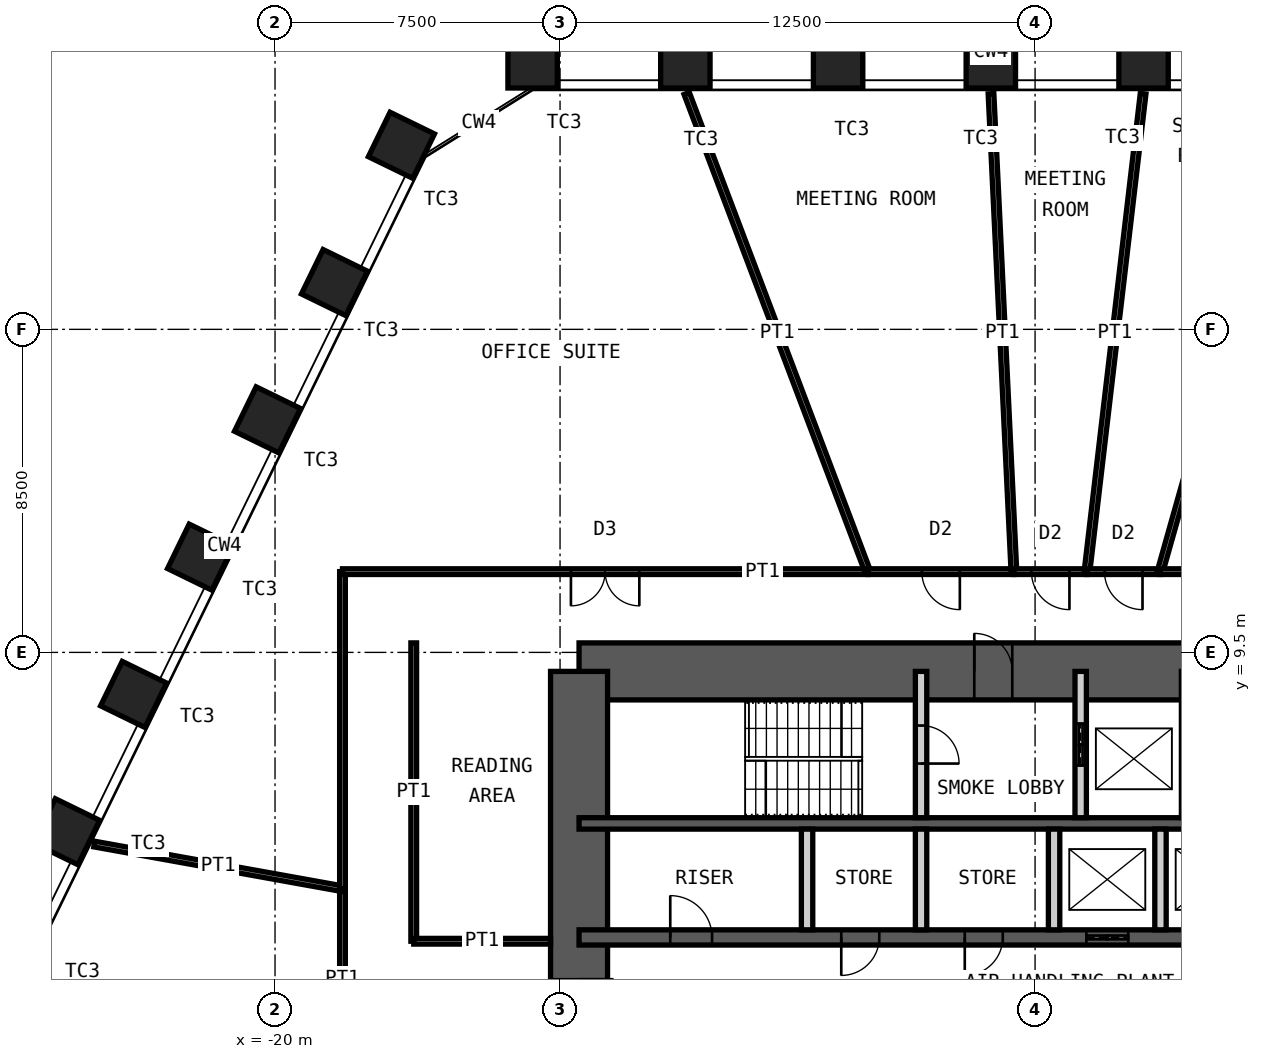
"""IFC4 building model, lengths in metres.
Left out: names, types, materials, properties, quantities, classifications, styles, units other than length and angle.
Written with IfcOpenShell. Run it as: python <this file> out.ifc"""

import sys

from ifc_helpers import new_model, si_unit, direction, frame, frame_2d, origin, origin_2d, place, context, subcontext, project, spatial, rectangle, hollow_rectangle, extrude, element, fill, save


model = new_model("IFC4")
c1 = context("Model", 3, precision=1e-05, world=origin(), true_north=direction((0.0, 1.0)))
c2 = subcontext(c1, "Body", "Model", "MODEL_VIEW")
j1 = project(units=[si_unit("LENGTHUNIT", "METRE"), si_unit("PLANEANGLEUNIT", "RADIAN")], contexts=[c1])
p1 = place(None, origin())
s1 = spatial("IfcSite", under=j1, at=p1, CompositionType="ELEMENT")
p2 = place(p1, origin())
s2 = spatial("IfcBuilding", under=s1, at=p2, CompositionType="ELEMENT")
p3 = place(p2, frame((0.0, 0.0, 111.4)))
s3 = spatial("IfcBuildingStorey", under=s2, at=p3, CompositionType="ELEMENT", Elevation=111.4)
for number, where, z_axis, x_axis in (
    (1, (-13.222, 25.0, 0.0), (0.0, 0.0, 1.0), (-1.0, 0.0, 0.0)),
    (2, (-9.203, 25.0, 0.0), (0.0, 0.0, 1.0), (-1.0, 0.0, 0.0)),
    (3, (-5.184, 25.0, 0.0), (0.0, 0.0, 1.0), (-1.0, 0.0, 0.0)),
    (4, (-1.165, 25.0, 0.0), (0.0, 0.0, 1.0), (-1.0, 0.0, 0.0)),
    (5, (2.854, 25.0, 0.0), (0.0, 0.0, 1.0), (-1.0, 0.0, 0.0)),
    (6, (-25.483, 4.781, 0.0), (0.0, 0.0, 1.0), (-0.438, -0.899, 0.0)),
    (7, (-23.721, 8.394, 0.0), (0.0, 0.0, 1.0), (-0.438, -0.899, 0.0)),
    (8, (-21.959, 12.006, 0.0), (0.0, 0.0, 1.0), (-0.438, -0.899, 0.0)),
    (9, (-20.198, 15.618, 0.0), (0.0, 0.0, 1.0), (-0.438, -0.899, 0.0)),
    (10, (-18.436, 19.23, 0.0), (0.0, 0.0, 1.0), (-0.438, -0.899, 0.0)),
    (11, (-16.674, 22.843, 0.0), (0.0, 0.0, 1.0), (-0.438, -0.899, 0.0)),
):
    element("IfcColumn", number, at=place(p3, frame(where, z_axis=z_axis, x_axis=x_axis)), inside=s3, PredefinedType="COLUMN", context=c2, shape_type="SweptSolid", body=[
        extrude(hollow_rectangle(XDim=1.3, YDim=1.3, WallThickness=0.1, at=origin_2d()), origin(), (0.0, 0.0, 1.0), 4.2),
    ])
p4 = place(p3, frame((-12.0, 9.0, 0.0), z_axis=(0.0, 0.0, 1.0), x_axis=(1.0, 0.0, 0.0)))
e12 = element("IfcWall", 12, at=p4, inside=s3, PredefinedType="SHEAR", context=c2, shape_type="SweptSolid", body=[
    extrude(rectangle(XDim=24.0, YDim=1.5, at=frame_2d((12.0, 0.0))), origin(), (0.0, 0.0, 1.0), 4.2),
])
p5 = place(p4, frame((10.4, 0.0, 0.0)))
e13 = element("IfcOpeningElement", 13, at=p5, cuts=e12, PredefinedType="OPENING", context=c2, shape_type="SweptSolid", body=[
    extrude(rectangle(XDim=1.0, YDim=2.1, at=frame_2d((0.5, 1.05))), frame((0.0, 0.76, 0.0), z_axis=(0.0, -1.0, 0.0), x_axis=(1.0, 0.0, 0.0)), (0.0, 0.0, 1.0), 1.52),
])
p6 = place(p4, frame((17.6, 0.0, 0.0)))
e14 = element("IfcOpeningElement", 14, at=p6, cuts=e12, PredefinedType="OPENING", context=c2, shape_type="SweptSolid", body=[
    extrude(rectangle(XDim=0.9, YDim=2.1, at=frame_2d((0.45, 1.05))), frame((0.0, 0.76, 0.0), z_axis=(0.0, -1.0, 0.0), x_axis=(1.0, 0.0, 0.0)), (0.0, 0.0, 1.0), 1.52),
])
p7 = place(p4, frame((21.9, 0.0, 0.0)))
e15 = element("IfcOpeningElement", 15, at=p7, cuts=e12, PredefinedType="OPENING", context=c2, shape_type="SweptSolid", body=[
    extrude(rectangle(XDim=0.9, YDim=2.1, at=frame_2d((0.45, 1.05))), frame((0.0, 0.76, 0.0), z_axis=(0.0, -1.0, 0.0), x_axis=(1.0, 0.0, 0.0)), (0.0, 0.0, 1.0), 1.52),
])
p8 = place(p3, frame((-12.0, -9.0, 0.0), z_axis=(0.0, 0.0, 1.0), x_axis=(0.0, 1.0, 0.0)))
e16 = element("IfcWall", 16, at=p8, inside=s3, PredefinedType="SHEAR", context=c2, shape_type="SweptSolid", body=[
    extrude(rectangle(XDim=18.0, YDim=1.5, at=frame_2d((9.0, 0.0))), origin(), (0.0, 0.0, 1.0), 4.2),
])
p9 = place(p8, frame((8.1, 0.0, 0.0)))
e17 = element("IfcOpeningElement", 17, at=p9, cuts=e16, PredefinedType="OPENING", context=c2, shape_type="SweptSolid", body=[
    extrude(rectangle(XDim=1.8, YDim=2.1, at=frame_2d((0.9, 1.05))), frame((0.0, 0.76, 0.0), z_axis=(0.0, -1.0, 0.0), x_axis=(1.0, 0.0, 0.0)), (0.0, 0.0, 1.0), 1.52),
])
p10 = place(p3, frame((-12.0, 5.0, 0.0), z_axis=(0.0, 0.0, 1.0), x_axis=(1.0, 0.0, 0.0)))
e18 = element("IfcWall", 18, at=p10, inside=s3, PredefinedType="SHEAR", context=c2, shape_type="SweptSolid", body=[
    extrude(rectangle(XDim=24.0, YDim=0.3, at=frame_2d((12.0, 0.0))), origin(), (0.0, 0.0, 1.0), 4.2),
])
p11 = place(p3, frame((-12.0, 2.0, 0.0), z_axis=(0.0, 0.0, 1.0), x_axis=(1.0, 0.0, 0.0)))
e19 = element("IfcWall", 19, at=p11, inside=s3, PredefinedType="SHEAR", context=c2, shape_type="SweptSolid", body=[
    extrude(rectangle(XDim=24.0, YDim=0.4, at=frame_2d((12.0, 0.0))), origin(), (0.0, 0.0, 1.0), 4.2),
])
p12 = place(p11, frame((2.4, 0.0, 0.0)))
e20 = element("IfcOpeningElement", 20, at=p12, cuts=e19, PredefinedType="OPENING", context=c2, shape_type="SweptSolid", body=[
    extrude(rectangle(XDim=1.1, YDim=2.1, at=frame_2d((0.55, 1.05))), frame((0.0, 0.21, 0.0), z_axis=(0.0, -1.0, 0.0), x_axis=(1.0, 0.0, 0.0)), (0.0, 0.0, 1.0), 0.42),
])
p13 = place(p11, frame((22.0, 0.0, 0.0)))
e21 = element("IfcOpeningElement", 21, at=p13, cuts=e19, PredefinedType="OPENING", context=c2, shape_type="SweptSolid", body=[
    extrude(rectangle(XDim=1.1, YDim=2.1, at=frame_2d((0.55, 1.05))), frame((0.0, 0.21, 0.0), z_axis=(0.0, -1.0, 0.0), x_axis=(1.0, 0.0, 0.0)), (0.0, 0.0, 1.0), 0.42),
])
p14 = place(p11, frame((10.15, 0.0, 0.0)))
e22 = element("IfcOpeningElement", 22, at=p14, cuts=e19, PredefinedType="OPENING", context=c2, shape_type="SweptSolid", body=[
    extrude(rectangle(XDim=1.0, YDim=2.1, at=frame_2d((0.5, 1.05))), frame((0.0, 0.21, 0.0), z_axis=(0.0, -1.0, 0.0), x_axis=(1.0, 0.0, 0.0)), (0.0, 0.0, 1.0), 0.42),
])
p15 = place(p11, frame((6.9, 0.0, 0.0)))
e23 = element("IfcOpeningElement", 23, at=p15, cuts=e19, PredefinedType="OPENING", context=c2, shape_type="SweptSolid", body=[
    extrude(rectangle(XDim=1.0, YDim=2.1, at=frame_2d((0.5, 1.05))), frame((0.0, 0.21, 0.0), z_axis=(0.0, -1.0, 0.0), x_axis=(1.0, 0.0, 0.0)), (0.0, 0.0, 1.0), 0.42),
])
p16 = place(p11, frame((13.35, 0.0, 0.0)))
e24 = element("IfcOpeningElement", 24, at=p16, cuts=e19, PredefinedType="OPENING", context=c2, shape_type="SweptSolid", body=[
    extrude(rectangle(XDim=1.1, YDim=2.4, at=frame_2d((0.55, 1.2))), frame((0.0, 0.21, 0.0), z_axis=(0.0, -1.0, 0.0), x_axis=(1.0, 0.0, 0.0)), (0.0, 0.0, 1.0), 0.42),
])
p17 = place(p11, frame((16.15, 0.0, 0.0)))
e25 = element("IfcOpeningElement", 25, at=p17, cuts=e19, PredefinedType="OPENING", context=c2, shape_type="SweptSolid", body=[
    extrude(rectangle(XDim=1.1, YDim=2.4, at=frame_2d((0.55, 1.2))), frame((0.0, 0.21, 0.0), z_axis=(0.0, -1.0, 0.0), x_axis=(1.0, 0.0, 0.0)), (0.0, 0.0, 1.0), 0.42),
])
p18 = place(p11, frame((18.95, 0.0, 0.0)))
e26 = element("IfcOpeningElement", 26, at=p18, cuts=e19, PredefinedType="OPENING", context=c2, shape_type="SweptSolid", body=[
    extrude(rectangle(XDim=1.1, YDim=2.4, at=frame_2d((0.55, 1.2))), frame((0.0, 0.21, 0.0), z_axis=(0.0, -1.0, 0.0), x_axis=(1.0, 0.0, 0.0)), (0.0, 0.0, 1.0), 0.42),
])
p19 = place(p3, frame((-3.0, 5.15, 0.0), z_axis=(0.0, 0.0, 1.0), x_axis=(0.0, 1.0, 0.0)))
e27 = element("IfcWall", 27, at=p19, inside=s3, PredefinedType="PARTITIONING", context=c2, shape_type="SweptSolid", body=[
    extrude(rectangle(XDim=3.85, YDim=0.3, at=frame_2d((1.925, 0.0))), origin(), (0.0, 0.0, 1.0), 3.98),
])
p20 = place(p19, frame((1.425, 0.0, 0.0)))
e28 = element("IfcOpeningElement", 28, at=p20, cuts=e27, PredefinedType="OPENING", context=c2, shape_type="SweptSolid", body=[
    extrude(rectangle(XDim=1.0, YDim=2.1, at=frame_2d((0.5, 1.05))), frame((0.0, 0.16, 0.0), z_axis=(0.0, -1.0, 0.0), x_axis=(1.0, 0.0, 0.0)), (0.0, 0.0, 1.0), 0.32),
])
p21 = place(p3, frame((1.2, 5.15, 0.0), z_axis=(0.0, 0.0, 1.0), x_axis=(0.0, 1.0, 0.0)))
e29 = element("IfcWall", 29, at=p21, inside=s3, PredefinedType="PARTITIONING", context=c2, shape_type="SweptSolid", body=[
    extrude(rectangle(XDim=3.85, YDim=0.3, at=frame_2d((1.925, 0.0))), origin(), (0.0, 0.0, 1.0), 3.98),
])
p22 = place(p21, frame((1.375, 0.0, 0.0)))
e30 = element("IfcOpeningElement", 30, at=p22, cuts=e29, PredefinedType="OPENING", context=c2, shape_type="SweptSolid", body=[
    extrude(rectangle(XDim=1.1, YDim=2.4, at=frame_2d((0.55, 1.2))), frame((0.0, 0.16, 0.0), z_axis=(0.0, -1.0, 0.0), x_axis=(1.0, 0.0, 0.0)), (0.0, 0.0, 1.0), 0.32),
])
p23 = place(p3, frame((4.0, 5.15, 0.0), z_axis=(0.0, 0.0, 1.0), x_axis=(0.0, 1.0, 0.0)))
e31 = element("IfcWall", 31, at=p23, inside=s3, PredefinedType="PARTITIONING", context=c2, shape_type="SweptSolid", body=[
    extrude(rectangle(XDim=3.85, YDim=0.3, at=frame_2d((1.925, 0.0))), origin(), (0.0, 0.0, 1.0), 3.98),
])
for number, where, z_axis, x_axis in (
    (32, (-6.0, 2.2, 0.0), (0.0, 0.0, 1.0), (0.0, 1.0, 0.0)),
    (33, (-3.0, 2.2, 0.0), (0.0, 0.0, 1.0), (0.0, 1.0, 0.0)),
    (34, (0.5, 2.2, 0.0), (0.0, 0.0, 1.0), (0.0, 1.0, 0.0)),
    (35, (3.3, 2.2, 0.0), (0.0, 0.0, 1.0), (0.0, 1.0, 0.0)),
):
    element("IfcWall", number, at=place(p3, frame(where, z_axis=z_axis, x_axis=x_axis)), inside=s3, PredefinedType="PARTITIONING", context=c2, shape_type="SweptSolid", body=[
        extrude(rectangle(XDim=2.65, YDim=0.3, at=frame_2d((1.325, 0.0))), origin(), (0.0, 0.0, 1.0), 3.98),
    ])
p24 = place(p3, frame((-18.225, -11.625, 0.0), z_axis=(0.0, 0.0, 1.0), x_axis=(0.0, 1.0, 0.0)))
e36 = element("IfcWall", 36, at=p24, inside=s3, PredefinedType="PARTITIONING", context=c2, shape_type="SweptSolid", body=[
    extrude(rectangle(XDim=14.906, YDim=0.15, at=frame_2d((7.453, 0.0))), origin(), (0.0, 0.0, 1.0), 4.03),
])
p25 = place(p24, frame((6.553, 0.0, 0.0)))
e37 = element("IfcOpeningElement", 37, at=p25, cuts=e36, PredefinedType="OPENING", context=c2, shape_type="SweptSolid", body=[
    extrude(rectangle(XDim=1.8, YDim=2.4, at=frame_2d((0.9, 1.2))), frame((0.0, 0.085, 0.0), z_axis=(0.0, -1.0, 0.0), x_axis=(1.0, 0.0, 0.0)), (0.0, 0.0, 1.0), 0.17),
])
p26 = place(p3, frame((-24.755, 4.457, 0.0), z_axis=(0.0, 0.0, 1.0), x_axis=(0.984174598206, -0.177201467959, 0.0)))
e38 = element("IfcWall", 38, at=p26, inside=s3, PredefinedType="PARTITIONING", context=c2, shape_type="SweptSolid", body=[
    extrude(rectangle(XDim=6.635, YDim=0.15, at=frame_2d((3.318, 0.0))), origin(), (0.0, 0.0, 1.0), 3.33),
])
p27 = place(p3, frame((-18.225, 3.281, 0.0), z_axis=(0.0, 0.0, 1.0), x_axis=(0.0, 1.0, 0.0)))
e39 = element("IfcWall", 39, at=p27, inside=s3, PredefinedType="PARTITIONING", context=c2, shape_type="SweptSolid", body=[
    extrude(rectangle(XDim=8.344, YDim=0.15, at=frame_2d((4.172, 0.0))), origin(), (0.0, 0.0, 1.0), 4.03),
])
p28 = place(p3, frame((-18.225, 11.625, 0.0), z_axis=(0.0, 0.0, 1.0), x_axis=(1.0, 0.0, 0.0)))
e40 = element("IfcWall", 40, at=p28, inside=s3, PredefinedType="PARTITIONING", context=c2, shape_type="SweptSolid", body=[
    extrude(rectangle(XDim=13.823, YDim=0.15, at=frame_2d((6.911, 0.0))), origin(), (0.0, 0.0, 1.0), 4.03),
])
p29 = place(p28, frame((6.011, 0.0, 0.0)))
e41 = element("IfcOpeningElement", 41, at=p29, cuts=e40, PredefinedType="OPENING", context=c2, shape_type="SweptSolid", body=[
    extrude(rectangle(XDim=1.8, YDim=2.4, at=frame_2d((0.9, 1.2))), frame((0.0, 0.085, 0.0), z_axis=(0.0, -1.0, 0.0), x_axis=(1.0, 0.0, 0.0)), (0.0, 0.0, 1.0), 0.17),
])
p30 = place(p3, frame((-9.167, 24.207, 0.0), z_axis=(0.0, 0.0, 1.0), x_axis=(0.354156368181, -0.935186220427, 0.0)))
e42 = element("IfcWall", 42, at=p30, inside=s3, PredefinedType="PARTITIONING", context=c2, shape_type="SweptSolid", body=[
    extrude(rectangle(XDim=13.454, YDim=0.15, at=frame_2d((6.727, 0.0))), origin(), (0.0, 0.0, 1.0), 3.33),
])
p31 = place(p3, frame((-4.403, 11.625, 0.0), z_axis=(0.0, 0.0, 1.0), x_axis=(1.0, 0.0, 0.0)))
e43 = element("IfcWall", 43, at=p31, inside=s3, PredefinedType="PARTITIONING", context=c2, shape_type="SweptSolid", body=[
    extrude(rectangle(XDim=3.845, YDim=0.15, at=frame_2d((1.923, 0.0))), origin(), (0.0, 0.0, 1.0), 4.03),
])
p32 = place(p31, frame((1.423, 0.0, 0.0)))
e44 = element("IfcOpeningElement", 44, at=p32, cuts=e43, PredefinedType="OPENING", context=c2, shape_type="SweptSolid", body=[
    extrude(rectangle(XDim=1.0, YDim=2.4, at=frame_2d((0.5, 1.2))), frame((0.0, 0.085, 0.0), z_axis=(0.0, -1.0, 0.0), x_axis=(1.0, 0.0, 0.0)), (0.0, 0.0, 1.0), 0.17),
])
p33 = place(p3, frame((-1.16, 24.2, 0.0), z_axis=(0.0, 0.0, 1.0), x_axis=(0.047859979164, -0.998854054602, 0.0)))
e45 = element("IfcWall", 45, at=p33, inside=s3, PredefinedType="PARTITIONING", context=c2, shape_type="SweptSolid", body=[
    extrude(rectangle(XDim=12.59, YDim=0.15, at=frame_2d((6.295, 0.0))), origin(), (0.0, 0.0, 1.0), 3.33),
])
p34 = place(p3, frame((-0.557, 11.625, 0.0), z_axis=(0.0, 0.0, 1.0), x_axis=(1.0, 0.0, 0.0)))
e46 = element("IfcWall", 46, at=p34, inside=s3, PredefinedType="PARTITIONING", context=c2, shape_type="SweptSolid", body=[
    extrude(rectangle(XDim=1.923, YDim=0.15, at=frame_2d((0.961, 0.0))), origin(), (0.0, 0.0, 1.0), 4.03),
])
p35 = place(p34, frame((0.461, 0.0, 0.0)))
e47 = element("IfcOpeningElement", 47, at=p35, cuts=e46, PredefinedType="OPENING", context=c2, shape_type="SweptSolid", body=[
    extrude(rectangle(XDim=1.0, YDim=2.4, at=frame_2d((0.5, 1.2))), frame((0.0, 0.085, 0.0), z_axis=(0.0, -1.0, 0.0), x_axis=(1.0, 0.0, 0.0)), (0.0, 0.0, 1.0), 0.17),
])
p36 = place(p3, frame((2.843, 24.201, 0.0), z_axis=(0.0, 0.0, 1.0), x_axis=(-0.116670084723, -0.993170726175, 0.0)))
e48 = element("IfcWall", 48, at=p36, inside=s3, PredefinedType="PARTITIONING", context=c2, shape_type="SweptSolid", body=[
    extrude(rectangle(XDim=12.662, YDim=0.15, at=frame_2d((6.331, 0.0))), origin(), (0.0, 0.0, 1.0), 3.33),
])
p37 = place(p3, frame((1.366, 11.625, 0.0), z_axis=(0.0, 0.0, 1.0), x_axis=(1.0, 0.0, 0.0)))
e49 = element("IfcWall", 49, at=p37, inside=s3, PredefinedType="PARTITIONING", context=c2, shape_type="SweptSolid", body=[
    extrude(rectangle(XDim=1.923, YDim=0.15, at=frame_2d((0.961, 0.0))), origin(), (0.0, 0.0, 1.0), 4.03),
])
p38 = place(p37, frame((0.461, 0.0, 0.0)))
e50 = element("IfcOpeningElement", 50, at=p38, cuts=e49, PredefinedType="OPENING", context=c2, shape_type="SweptSolid", body=[
    extrude(rectangle(XDim=1.0, YDim=2.4, at=frame_2d((0.5, 1.2))), frame((0.0, 0.085, 0.0), z_axis=(0.0, -1.0, 0.0), x_axis=(1.0, 0.0, 0.0)), (0.0, 0.0, 1.0), 0.17),
])
p39 = place(p3, frame((6.846, 24.204, 0.0), z_axis=(0.0, 0.0, 1.0), x_axis=(-0.272184461049, -0.962245093084, 0.0)))
e51 = element("IfcWall", 51, at=p39, inside=s3, PredefinedType="PARTITIONING", context=c2, shape_type="SweptSolid", body=[
    extrude(rectangle(XDim=13.073, YDim=0.15, at=frame_2d((6.536, 0.0))), origin(), (0.0, 0.0, 1.0), 3.33),
])
p40 = place(p3, frame((3.288, 11.625, 0.0), z_axis=(0.0, 0.0, 1.0), x_axis=(1.0, 0.0, 0.0)))
e52 = element("IfcWall", 52, at=p40, inside=s3, PredefinedType="PARTITIONING", context=c2, shape_type="SweptSolid", body=[
    extrude(rectangle(XDim=6.538, YDim=0.15, at=frame_2d((3.269, 0.0))), origin(), (0.0, 0.0, 1.0), 4.03),
])
p41 = place(p40, frame((2.769, 0.0, 0.0)))
e53 = element("IfcOpeningElement", 53, at=p41, cuts=e52, PredefinedType="OPENING", context=c2, shape_type="SweptSolid", body=[
    extrude(rectangle(XDim=1.0, YDim=2.4, at=frame_2d((0.5, 1.2))), frame((0.0, 0.085, 0.0), z_axis=(0.0, -1.0, 0.0), x_axis=(1.0, 0.0, 0.0)), (0.0, 0.0, 1.0), 0.17),
])
p42 = place(p3, frame((-16.35, 1.9, 0.0), z_axis=(0.0, 0.0, 1.0), x_axis=(0.0, 1.0, 0.0)))
e54 = element("IfcWall", 54, at=p42, inside=s3, PredefinedType="PARTITIONING", context=c2, shape_type="SweptSolid", body=[
    extrude(rectangle(XDim=7.85, YDim=0.15, at=frame_2d((3.925, 0.0))), origin(), (0.0, 0.0, 1.0), 4.03),
])
p43 = place(p3, frame((-12.75, 1.9, 0.0), z_axis=(0.0, 0.0, 1.0), x_axis=(-1.0, 0.0, 0.0)))
e55 = element("IfcWall", 55, at=p43, inside=s3, PredefinedType="PARTITIONING", context=c2, shape_type="SweptSolid", body=[
    extrude(rectangle(XDim=3.6, YDim=0.15, at=frame_2d((1.8, 0.0))), origin(), (0.0, 0.0, 1.0), 3.33),
])
p44 = place(p5, origin())
e56 = element("IfcDoor", 56, at=p44, inside=s3, OperationType="SINGLE_SWING_RIGHT", PredefinedType="DOOR", context=c2, shape_type="SweptSolid", body=[
    extrude(rectangle(XDim=1.0, YDim=2.1, at=frame_2d((0.5, 1.05))), frame((0.0, 0.025, 0.0), z_axis=(0.0, -1.0, 0.0), x_axis=(1.0, 0.0, 0.0)), (0.0, 0.0, 1.0), 0.05),
])
fill(e13, e56)
p45 = place(p20, origin())
e57 = element("IfcDoor", 57, at=p45, inside=s3, OperationType="SINGLE_SWING_LEFT", PredefinedType="DOOR", context=c2, shape_type="SweptSolid", body=[
    extrude(rectangle(XDim=1.0, YDim=2.1, at=frame_2d((0.5, 1.05))), frame((0.0, 0.025, 0.0), z_axis=(0.0, -1.0, 0.0), x_axis=(1.0, 0.0, 0.0)), (0.0, 0.0, 1.0), 0.05),
])
fill(e28, e57)
p46 = place(p12, origin())
e58 = element("IfcDoor", 58, at=p46, inside=s3, OperationType="SINGLE_SWING_RIGHT", PredefinedType="DOOR", context=c2, shape_type="SweptSolid", body=[
    extrude(rectangle(XDim=1.1, YDim=2.1, at=frame_2d((0.55, 1.05))), frame((0.0, 0.025, 0.0), z_axis=(0.0, -1.0, 0.0), x_axis=(1.0, 0.0, 0.0)), (0.0, 0.0, 1.0), 0.05),
])
fill(e20, e58)
p47 = place(p14, origin())
e59 = element("IfcDoor", 59, at=p47, inside=s3, OperationType="SINGLE_SWING_LEFT", PredefinedType="DOOR", context=c2, shape_type="SweptSolid", body=[
    extrude(rectangle(XDim=1.0, YDim=2.1, at=frame_2d((0.5, 1.05))), frame((0.0, 0.025, 0.0), z_axis=(0.0, -1.0, 0.0), x_axis=(1.0, 0.0, 0.0)), (0.0, 0.0, 1.0), 0.05),
])
fill(e22, e59)
p48 = place(p9, origin())
e60 = element("IfcDoor", 60, at=p48, inside=s3, OperationType="DOUBLE_DOOR_DOUBLE_SWING", PredefinedType="DOOR", context=c2, shape_type="SweptSolid", body=[
    extrude(rectangle(XDim=1.8, YDim=2.1, at=frame_2d((0.9, 1.05))), frame((0.0, 0.025, 0.0), z_axis=(0.0, -1.0, 0.0), x_axis=(1.0, 0.0, 0.0)), (0.0, 0.0, 1.0), 0.05),
])
fill(e17, e60)
p49 = place(p22, origin())
e61 = element("IfcDoor", 61, at=p49, inside=s3, OperationType="DOUBLE_DOOR_SLIDING", PredefinedType="DOOR", context=c2, shape_type="SweptSolid", body=[
    extrude(rectangle(XDim=1.1, YDim=2.4, at=frame_2d((0.55, 1.2))), frame((0.0, 0.025, 0.0), z_axis=(0.0, -1.0, 0.0), x_axis=(1.0, 0.0, 0.0)), (0.0, 0.0, 1.0), 0.05),
])
fill(e30, e61)
p50 = place(p15, origin())
e62 = element("IfcDoor", 62, at=p50, inside=s3, OperationType="SINGLE_SWING_LEFT", PredefinedType="DOOR", context=c2, shape_type="SweptSolid", body=[
    extrude(rectangle(XDim=1.0, YDim=2.1, at=frame_2d((0.5, 1.05))), frame((0.0, 0.025, 0.0), z_axis=(0.0, -1.0, 0.0), x_axis=(1.0, 0.0, 0.0)), (0.0, 0.0, 1.0), 0.05),
])
fill(e23, e62)
p51 = place(p16, origin())
e63 = element("IfcDoor", 63, at=p51, inside=s3, OperationType="DOUBLE_DOOR_SLIDING", PredefinedType="DOOR", context=c2, shape_type="SweptSolid", body=[
    extrude(rectangle(XDim=1.1, YDim=2.4, at=frame_2d((0.55, 1.2))), frame((0.0, 0.025, 0.0), z_axis=(0.0, -1.0, 0.0), x_axis=(1.0, 0.0, 0.0)), (0.0, 0.0, 1.0), 0.05),
])
fill(e24, e63)
p52 = place(p29, origin())
e64 = element("IfcDoor", 64, at=p52, inside=s3, OperationType="DOUBLE_DOOR_DOUBLE_SWING", PredefinedType="DOOR", context=c2, shape_type="SweptSolid", body=[
    extrude(rectangle(XDim=1.8, YDim=2.4, at=frame_2d((0.9, 1.2))), frame((0.0, 0.025, 0.0), z_axis=(0.0, -1.0, 0.0), x_axis=(1.0, 0.0, 0.0)), (0.0, 0.0, 1.0), 0.05),
])
fill(e41, e64)
p53 = place(p32, origin())
e65 = element("IfcDoor", 65, at=p53, inside=s3, OperationType="SINGLE_SWING_RIGHT", PredefinedType="DOOR", context=c2, shape_type="SweptSolid", body=[
    extrude(rectangle(XDim=1.0, YDim=2.4, at=frame_2d((0.5, 1.2))), frame((0.0, 0.025, 0.0), z_axis=(0.0, -1.0, 0.0), x_axis=(1.0, 0.0, 0.0)), (0.0, 0.0, 1.0), 0.05),
])
fill(e44, e65)
p54 = place(p35, origin())
e66 = element("IfcDoor", 66, at=p54, inside=s3, OperationType="SINGLE_SWING_RIGHT", PredefinedType="DOOR", context=c2, shape_type="SweptSolid", body=[
    extrude(rectangle(XDim=1.0, YDim=2.4, at=frame_2d((0.5, 1.2))), frame((0.0, 0.025, 0.0), z_axis=(0.0, -1.0, 0.0), x_axis=(1.0, 0.0, 0.0)), (0.0, 0.0, 1.0), 0.05),
])
fill(e47, e66)
p55 = place(p38, origin())
e67 = element("IfcDoor", 67, at=p55, inside=s3, OperationType="SINGLE_SWING_RIGHT", PredefinedType="DOOR", context=c2, shape_type="SweptSolid", body=[
    extrude(rectangle(XDim=1.0, YDim=2.4, at=frame_2d((0.5, 1.2))), frame((0.0, 0.025, 0.0), z_axis=(0.0, -1.0, 0.0), x_axis=(1.0, 0.0, 0.0)), (0.0, 0.0, 1.0), 0.05),
])
fill(e50, e67)
save(model, sys.argv[1])
